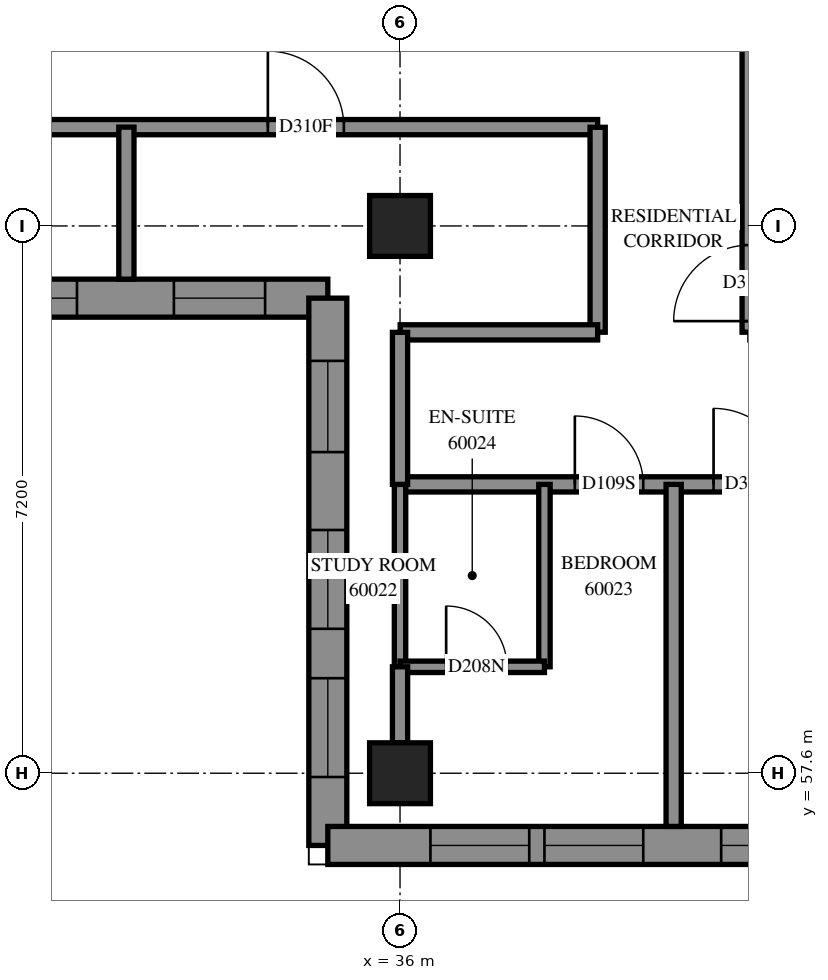
"""IFC4 building model, lengths in metres.
Left out: names, types, materials, properties, quantities, classifications, styles, units other than length and angle.
Written with IfcOpenShell. Run it as: python <this file> out.ifc"""

import sys

from ifc_helpers import new_model, si_unit, direction, frame, frame_2d, origin, origin_2d, place, context, subcontext, project, spatial, polyline, rectangle, outline, extrude, element, fill, save


model = new_model("IFC4")
c1 = context("Model", 3, precision=1e-05, world=origin(), true_north=direction((0.0, 1.0)))
c2 = subcontext(c1, "Body", "Model", "MODEL_VIEW")
j1 = project(units=[si_unit("LENGTHUNIT", "METRE"), si_unit("PLANEANGLEUNIT", "RADIAN")], contexts=[c1])
p1 = place(None, origin())
s1 = spatial("IfcSite", under=j1, at=p1, CompositionType="ELEMENT")
p2 = place(p1, origin())
s2 = spatial("IfcBuilding", under=s1, at=p2, CompositionType="ELEMENT")
p3 = place(p2, frame((0.0, 0.0, 220.2)))
s3 = spatial("IfcBuildingStorey", under=s2, at=p3, CompositionType="ELEMENT", Elevation=220.2)
for number, where, z_axis, x_axis in (
    (1, (36.0, 57.6, 0.0), (0.0, 0.0, 1.0), (1.0, 0.0, 0.0)),
    (2, (36.0, 64.8, 0.0), (0.0, 0.0, 1.0), (1.0, 0.0, 0.0)),
):
    element("IfcColumn", number, at=place(p3, frame(where, z_axis=z_axis, x_axis=x_axis)), inside=s3, PredefinedType="COLUMN", context=c2, shape_type="SweptSolid", body=[
        extrude(rectangle(XDim=0.8, YDim=0.8, at=origin_2d()), origin(), (0.0, 0.0, 1.0), 3.1),
    ])
p4 = place(p3, frame((26.678, 63.85, 0.0), z_axis=(0.0, 0.0, 1.0), x_axis=(1.0, 0.0, 0.0)))
e3 = element("IfcWall", 3, at=p4, inside=s3, PredefinedType="SOLIDWALL", context=c2, shape_type="SweptSolid", body=[
    extrude(outline(polyline([(-0.25, -0.25), (8.122, -0.25), (8.622, 0.25), (0.25, 0.25), (-0.25, -0.25)])), origin(), (0.0, 0.0, 1.0), 3.1),
])
p5 = place(p4, frame((2.272, 0.0, 0.45)))
e4 = element("IfcOpeningElement", 4, at=p5, cuts=e3, PredefinedType="OPENING", context=c2, shape_type="SweptSolid", body=[
    extrude(rectangle(XDim=1.3, YDim=2.5, at=frame_2d((0.65, 1.25))), frame((0.0, 0.26, 0.0), z_axis=(0.0, -1.0, 0.0), x_axis=(1.0, 0.0, 0.0)), (0.0, 0.0, 1.0), 0.52),
])
p6 = place(p4, frame((3.772, 0.0, 0.45)))
e5 = element("IfcOpeningElement", 5, at=p6, cuts=e3, PredefinedType="OPENING", context=c2, shape_type="SweptSolid", body=[
    extrude(rectangle(XDim=1.3, YDim=2.5, at=frame_2d((0.65, 1.25))), frame((0.0, 0.26, 0.0), z_axis=(0.0, -1.0, 0.0), x_axis=(1.0, 0.0, 0.0)), (0.0, 0.0, 1.0), 0.52),
])
p7 = place(p4, frame((0.686, 0.0, 0.45)))
e6 = element("IfcOpeningElement", 6, at=p7, cuts=e3, PredefinedType="OPENING", context=c2, shape_type="SweptSolid", body=[
    extrude(rectangle(XDim=1.2, YDim=2.5, at=frame_2d((0.6, 1.25))), frame((0.0, 0.26, 0.0), z_axis=(0.0, -1.0, 0.0), x_axis=(1.0, 0.0, 0.0)), (0.0, 0.0, 1.0), 0.52),
])
p8 = place(p4, frame((6.347, 0.0, 0.45)))
e7 = element("IfcOpeningElement", 7, at=p8, cuts=e3, PredefinedType="OPENING", context=c2, shape_type="SweptSolid", body=[
    extrude(rectangle(XDim=1.2, YDim=2.5, at=frame_2d((0.6, 1.25))), frame((0.0, 0.26, 0.0), z_axis=(0.0, -1.0, 0.0), x_axis=(1.0, 0.0, 0.0)), (0.0, 0.0, 1.0), 0.52),
])
p9 = place(p3, frame((35.05, 63.85, 0.0), z_axis=(0.0, 0.0, 1.0), x_axis=(0.0, -1.0, 0.0)))
e8 = element("IfcWall", 8, at=p9, inside=s3, PredefinedType="SOLIDWALL", context=c2, shape_type="SweptSolid", body=[
    extrude(outline(polyline([(0.25, -0.25), (7.45, -0.25), (6.95, 0.25), (-0.25, 0.25), (0.25, -0.25)])), origin(), (0.0, 0.0, 1.0), 3.1),
])
p10 = place(p9, frame((3.05, 0.0, 0.45)))
e9 = element("IfcOpeningElement", 9, at=p10, cuts=e8, PredefinedType="OPENING", context=c2, shape_type="SweptSolid", body=[
    extrude(rectangle(XDim=1.3, YDim=2.5, at=frame_2d((0.65, 1.25))), frame((0.0, 0.26, 0.0), z_axis=(0.0, -1.0, 0.0), x_axis=(1.0, 0.0, 0.0)), (0.0, 0.0, 1.0), 0.52),
])
p11 = place(p9, frame((5.0, 0.0, 0.45)))
e10 = element("IfcOpeningElement", 10, at=p11, cuts=e8, PredefinedType="OPENING", context=c2, shape_type="SweptSolid", body=[
    extrude(rectangle(XDim=1.3, YDim=2.5, at=frame_2d((0.65, 1.25))), frame((0.0, 0.26, 0.0), z_axis=(0.0, -1.0, 0.0), x_axis=(1.0, 0.0, 0.0)), (0.0, 0.0, 1.0), 0.52),
])
p12 = place(p9, frame((0.825, 0.0, 0.45)))
e11 = element("IfcOpeningElement", 11, at=p12, cuts=e8, PredefinedType="OPENING", context=c2, shape_type="SweptSolid", body=[
    extrude(rectangle(XDim=1.2, YDim=2.5, at=frame_2d((0.6, 1.25))), frame((0.0, 0.26, 0.0), z_axis=(0.0, -1.0, 0.0), x_axis=(1.0, 0.0, 0.0)), (0.0, 0.0, 1.0), 0.52),
])
p13 = place(p3, frame((35.05, 56.65, 0.0), z_axis=(0.0, 0.0, 1.0), x_axis=(1.0, 0.0, 0.0)))
e12 = element("IfcWall", 12, at=p13, inside=s3, PredefinedType="SOLIDWALL", context=c2, shape_type="SweptSolid", body=[
    extrude(outline(polyline([(-0.25, -0.25), (6.95, -0.25), (7.45, 0.25), (0.25, 0.25), (-0.25, -0.25)])), origin(), (0.0, 0.0, 1.0), 3.1),
])
p14 = place(p13, frame((1.35, 0.0, 0.45)))
e13 = element("IfcOpeningElement", 13, at=p14, cuts=e12, PredefinedType="OPENING", context=c2, shape_type="SweptSolid", body=[
    extrude(rectangle(XDim=1.3, YDim=2.5, at=frame_2d((0.65, 1.25))), frame((0.0, 0.26, 0.0), z_axis=(0.0, -1.0, 0.0), x_axis=(1.0, 0.0, 0.0)), (0.0, 0.0, 1.0), 0.52),
])
p15 = place(p13, frame((2.85, 0.0, 0.45)))
e14 = element("IfcOpeningElement", 14, at=p15, cuts=e12, PredefinedType="OPENING", context=c2, shape_type="SweptSolid", body=[
    extrude(rectangle(XDim=1.3, YDim=2.5, at=frame_2d((0.65, 1.25))), frame((0.0, 0.26, 0.0), z_axis=(0.0, -1.0, 0.0), x_axis=(1.0, 0.0, 0.0)), (0.0, 0.0, 1.0), 0.52),
])
p16 = place(p13, frame((5.175, 0.0, 0.45)))
e15 = element("IfcOpeningElement", 15, at=p16, cuts=e12, PredefinedType="OPENING", context=c2, shape_type="SweptSolid", body=[
    extrude(rectangle(XDim=1.2, YDim=2.5, at=frame_2d((0.6, 1.25))), frame((0.0, 0.26, 0.0), z_axis=(0.0, -1.0, 0.0), x_axis=(1.0, 0.0, 0.0)), (0.0, 0.0, 1.0), 0.52),
])
p17 = place(p3, frame((36.0, 61.4, 0.0), z_axis=(0.0, 0.0, 1.0), x_axis=(1.0, 0.0, 0.0)))
e16 = element("IfcWall", 16, at=p17, inside=s3, PredefinedType="PARTITIONING", context=c2, shape_type="SweptSolid", body=[
    extrude(rectangle(XDim=17.0, YDim=0.2, at=frame_2d((8.5, 0.0))), origin(), (0.0, 0.0, 1.0), 3.1),
])
p18 = place(p17, frame((2.3, 0.0, 0.0)))
e17 = element("IfcOpeningElement", 17, at=p18, cuts=e16, PredefinedType="OPENING", context=c2, shape_type="SweptSolid", body=[
    extrude(rectangle(XDim=0.9, YDim=2.1, at=frame_2d((0.45, 1.05))), frame((0.0, 0.11, 0.0), z_axis=(0.0, -1.0, 0.0), x_axis=(1.0, 0.0, 0.0)), (0.0, 0.0, 1.0), 0.22),
])
p19 = place(p17, frame((4.125, 0.0, 0.0)))
e18 = element("IfcOpeningElement", 18, at=p19, cuts=e16, PredefinedType="OPENING", context=c2, shape_type="SweptSolid", body=[
    extrude(rectangle(XDim=1.0, YDim=2.1, at=frame_2d((0.5, 1.05))), frame((0.0, 0.11, 0.0), z_axis=(0.0, -1.0, 0.0), x_axis=(1.0, 0.0, 0.0)), (0.0, 0.0, 1.0), 0.22),
])
p20 = place(p17, frame((9.5, 0.0, 0.0)))
e19 = element("IfcOpeningElement", 19, at=p20, cuts=e16, PredefinedType="OPENING", context=c2, shape_type="SweptSolid", body=[
    extrude(rectangle(XDim=0.9, YDim=2.1, at=frame_2d((0.45, 1.05))), frame((0.0, 0.11, 0.0), z_axis=(0.0, -1.0, 0.0), x_axis=(1.0, 0.0, 0.0)), (0.0, 0.0, 1.0), 0.22),
])
p21 = place(p17, frame((11.48, 0.0, 0.0)))
e20 = element("IfcOpeningElement", 20, at=p21, cuts=e16, PredefinedType="OPENING", context=c2, shape_type="SweptSolid", body=[
    extrude(rectangle(XDim=1.0, YDim=2.1, at=frame_2d((0.5, 1.05))), frame((0.0, 0.11, 0.0), z_axis=(0.0, -1.0, 0.0), x_axis=(1.0, 0.0, 0.0)), (0.0, 0.0, 1.0), 0.22),
])
p22 = place(p17, frame((15.805, 0.0, 0.0)))
e21 = element("IfcOpeningElement", 21, at=p22, cuts=e16, PredefinedType="OPENING", context=c2, shape_type="SweptSolid", body=[
    extrude(rectangle(XDim=1.0, YDim=2.1, at=frame_2d((0.5, 1.05))), frame((0.0, 0.11, 0.0), z_axis=(0.0, -1.0, 0.0), x_axis=(1.0, 0.0, 0.0)), (0.0, 0.0, 1.0), 0.22),
])
p23 = place(p3, frame((28.802, 66.1, 0.0), z_axis=(0.0, 0.0, 1.0), x_axis=(1.0, 0.0, 0.0)))
e22 = element("IfcWall", 22, at=p23, inside=s3, PredefinedType="PARTITIONING", context=c2, shape_type="SweptSolid", body=[
    extrude(rectangle(XDim=9.798, YDim=0.2, at=frame_2d((4.899, 0.0))), origin(), (0.0, 0.0, 1.0), 3.1),
])
p24 = place(p23, frame((0.449, 0.0, 0.0)))
e23 = element("IfcOpeningElement", 23, at=p24, cuts=e22, PredefinedType="OPENING", context=c2, shape_type="SweptSolid", body=[
    extrude(rectangle(XDim=1.0, YDim=2.1, at=frame_2d((0.5, 1.05))), frame((0.0, 0.11, 0.0), z_axis=(0.0, -1.0, 0.0), x_axis=(1.0, 0.0, 0.0)), (0.0, 0.0, 1.0), 0.22),
])
p25 = place(p23, frame((5.459, 0.0, 0.0)))
e24 = element("IfcOpeningElement", 24, at=p25, cuts=e22, PredefinedType="OPENING", context=c2, shape_type="SweptSolid", body=[
    extrude(rectangle(XDim=1.0, YDim=2.1, at=frame_2d((0.5, 1.05))), frame((0.0, 0.11, 0.0), z_axis=(0.0, -1.0, 0.0), x_axis=(1.0, 0.0, 0.0)), (0.0, 0.0, 1.0), 0.22),
])
p26 = place(p3, frame((40.6, 63.402, 0.0), z_axis=(0.0, 0.0, 1.0), x_axis=(0.0, 1.0, 0.0)))
e25 = element("IfcWall", 25, at=p26, inside=s3, PredefinedType="PARTITIONING", context=c2, shape_type="SweptSolid", body=[
    extrude(rectangle(XDim=4.698, YDim=0.2, at=frame_2d((2.349, 0.0))), origin(), (0.0, 0.0, 1.0), 3.1),
])
p27 = place(p26, frame((0.146, 0.0, 0.0)))
e26 = element("IfcOpeningElement", 26, at=p27, cuts=e25, PredefinedType="OPENING", context=c2, shape_type="SweptSolid", body=[
    extrude(rectangle(XDim=1.0, YDim=2.1, at=frame_2d((0.5, 1.05))), frame((0.0, 0.11, 0.0), z_axis=(0.0, -1.0, 0.0), x_axis=(1.0, 0.0, 0.0)), (0.0, 0.0, 1.0), 0.22),
])
p28 = place(p3, frame((39.6, 56.9, 0.0), z_axis=(0.0, 0.0, 1.0), x_axis=(0.0, 1.0, 0.0)))
e27 = element("IfcWall", 27, at=p28, inside=s3, PredefinedType="PARTITIONING", context=c2, shape_type="SweptSolid", body=[
    extrude(rectangle(XDim=4.5, YDim=0.2, at=frame_2d((2.25, 0.0))), origin(), (0.0, 0.0, 1.0), 3.1),
])
p29 = place(p3, frame((38.6, 63.402, 0.0), z_axis=(0.0, 0.0, 1.0), x_axis=(0.0, 1.0, 0.0)))
e28 = element("IfcWall", 28, at=p29, inside=s3, PredefinedType="PARTITIONING", context=c2, shape_type="SweptSolid", body=[
    extrude(rectangle(XDim=2.696, YDim=0.2, at=frame_2d((1.348, 0.0))), origin(), (0.0, 0.0, 1.0), 3.1),
])
p30 = place(p3, frame((36.002, 63.4, 0.0), z_axis=(0.0, 0.0, 1.0), x_axis=(1.0, 0.0, 0.0)))
e29 = element("IfcWall", 29, at=p30, inside=s3, PredefinedType="PARTITIONING", context=c2, shape_type="SweptSolid", body=[
    extrude(rectangle(XDim=2.598, YDim=0.2, at=frame_2d((1.299, 0.0))), origin(), (0.0, 0.0, 1.0), 3.1),
])
p31 = place(p3, frame((37.9, 59.0, 0.0), z_axis=(0.0, 0.0, 1.0), x_axis=(0.0, 1.0, 0.0)))
e30 = element("IfcWall", 30, at=p31, inside=s3, PredefinedType="PARTITIONING", context=c2, shape_type="SweptSolid", body=[
    extrude(rectangle(XDim=2.4, YDim=0.15, at=frame_2d((1.2, 0.0))), origin(), (0.0, 0.0, 1.0), 3.1),
])
p32 = place(p3, frame((36.0, 59.0, 0.0), z_axis=(0.0, 0.0, 1.0), x_axis=(0.0, 1.0, 0.0)))
e31 = element("IfcWall", 31, at=p32, inside=s3, PredefinedType="PARTITIONING", context=c2, shape_type="SweptSolid", body=[
    extrude(rectangle(XDim=2.4, YDim=0.15, at=frame_2d((1.2, 0.0))), origin(), (0.0, 0.0, 1.0), 2.6),
])
p33 = place(p3, frame((36.0, 61.4, 0.0), z_axis=(0.0, 0.0, 1.0), x_axis=(0.0, 1.0, 0.0)))
e32 = element("IfcWall", 32, at=p33, inside=s3, PredefinedType="PARTITIONING", context=c2, shape_type="SweptSolid", body=[
    extrude(rectangle(XDim=2.0, YDim=0.2, at=frame_2d((1.0, 0.0))), origin(), (0.0, 0.0, 1.0), 2.6),
])
p34 = place(p3, frame((32.4, 64.1, 0.0), z_axis=(0.0, 0.0, 1.0), x_axis=(0.0, 1.0, 0.0)))
e33 = element("IfcWall", 33, at=p34, inside=s3, PredefinedType="PARTITIONING", context=c2, shape_type="SweptSolid", body=[
    extrude(rectangle(XDim=2.0, YDim=0.2, at=frame_2d((1.0, 0.0))), origin(), (0.0, 0.0, 1.0), 3.1),
])
p35 = place(p3, frame((36.0, 59.0, 0.0), z_axis=(0.0, 0.0, 1.0), x_axis=(1.0, 0.0, 0.0)))
e34 = element("IfcWall", 34, at=p35, inside=s3, PredefinedType="PARTITIONING", context=c2, shape_type="SweptSolid", body=[
    extrude(rectangle(XDim=1.9, YDim=0.15, at=frame_2d((0.95, 0.0))), origin(), (0.0, 0.0, 1.0), 3.1),
])
p36 = place(p35, frame((0.607, 0.0, 0.0)))
e35 = element("IfcOpeningElement", 35, at=p36, cuts=e34, PredefinedType="OPENING", context=c2, shape_type="SweptSolid", body=[
    extrude(rectangle(XDim=0.8, YDim=2.1, at=frame_2d((0.4, 1.05))), frame((0.0, 0.085, 0.0), z_axis=(0.0, -1.0, 0.0), x_axis=(1.0, 0.0, 0.0)), (0.0, 0.0, 1.0), 0.17),
])
p37 = place(p3, frame((36.0, 58.0, 0.0), z_axis=(0.0, 0.0, 1.0), x_axis=(0.0, 1.0, 0.0)))
e36 = element("IfcWall", 36, at=p37, inside=s3, PredefinedType="PARTITIONING", context=c2, shape_type="SweptSolid", body=[
    extrude(rectangle(XDim=1.0, YDim=0.2, at=frame_2d((0.5, 0.0))), origin(), (0.0, 0.0, 1.0), 2.6),
])
p38 = place(p6, origin())
e37 = element("IfcWindow", 37, at=p38, inside=s3, PartitioningType="SINGLE_PANEL", PredefinedType="WINDOW", context=c2, shape_type="SweptSolid", body=[
    extrude(rectangle(XDim=1.3, YDim=2.5, at=frame_2d((0.65, 1.25))), frame((0.0, 0.18, 0.0), z_axis=(0.0, -1.0, 0.0), x_axis=(1.0, 0.0, 0.0)), (0.0, 0.0, 1.0), 0.06),
])
fill(e5, e37)
p39 = place(p8, origin())
e38 = element("IfcWindow", 38, at=p39, inside=s3, PartitioningType="SINGLE_PANEL", PredefinedType="WINDOW", context=c2, shape_type="SweptSolid", body=[
    extrude(rectangle(XDim=1.2, YDim=2.5, at=frame_2d((0.6, 1.25))), frame((0.0, 0.18, 0.0), z_axis=(0.0, -1.0, 0.0), x_axis=(1.0, 0.0, 0.0)), (0.0, 0.0, 1.0), 0.06),
])
fill(e7, e38)
p40 = place(p10, origin())
e39 = element("IfcWindow", 39, at=p40, inside=s3, PartitioningType="SINGLE_PANEL", PredefinedType="WINDOW", context=c2, shape_type="SweptSolid", body=[
    extrude(rectangle(XDim=1.3, YDim=2.5, at=frame_2d((0.65, 1.25))), frame((0.0, 0.18, 0.0), z_axis=(0.0, -1.0, 0.0), x_axis=(1.0, 0.0, 0.0)), (0.0, 0.0, 1.0), 0.06),
])
fill(e9, e39)
p41 = place(p11, origin())
e40 = element("IfcWindow", 40, at=p41, inside=s3, PartitioningType="SINGLE_PANEL", PredefinedType="WINDOW", context=c2, shape_type="SweptSolid", body=[
    extrude(rectangle(XDim=1.3, YDim=2.5, at=frame_2d((0.65, 1.25))), frame((0.0, 0.18, 0.0), z_axis=(0.0, -1.0, 0.0), x_axis=(1.0, 0.0, 0.0)), (0.0, 0.0, 1.0), 0.06),
])
fill(e10, e40)
p42 = place(p12, origin())
e41 = element("IfcWindow", 41, at=p42, inside=s3, PartitioningType="SINGLE_PANEL", PredefinedType="WINDOW", context=c2, shape_type="SweptSolid", body=[
    extrude(rectangle(XDim=1.2, YDim=2.5, at=frame_2d((0.6, 1.25))), frame((0.0, 0.18, 0.0), z_axis=(0.0, -1.0, 0.0), x_axis=(1.0, 0.0, 0.0)), (0.0, 0.0, 1.0), 0.06),
])
fill(e11, e41)
p43 = place(p14, origin())
e42 = element("IfcWindow", 42, at=p43, inside=s3, PartitioningType="SINGLE_PANEL", PredefinedType="WINDOW", context=c2, shape_type="SweptSolid", body=[
    extrude(rectangle(XDim=1.3, YDim=2.5, at=frame_2d((0.65, 1.25))), frame((0.0, 0.18, 0.0), z_axis=(0.0, -1.0, 0.0), x_axis=(1.0, 0.0, 0.0)), (0.0, 0.0, 1.0), 0.06),
])
fill(e13, e42)
p44 = place(p15, origin())
e43 = element("IfcWindow", 43, at=p44, inside=s3, PartitioningType="SINGLE_PANEL", PredefinedType="WINDOW", context=c2, shape_type="SweptSolid", body=[
    extrude(rectangle(XDim=1.3, YDim=2.5, at=frame_2d((0.65, 1.25))), frame((0.0, 0.18, 0.0), z_axis=(0.0, -1.0, 0.0), x_axis=(1.0, 0.0, 0.0)), (0.0, 0.0, 1.0), 0.06),
])
fill(e14, e43)
p45 = place(p16, origin())
e44 = element("IfcWindow", 44, at=p45, inside=s3, PartitioningType="SINGLE_PANEL", PredefinedType="WINDOW", context=c2, shape_type="SweptSolid", body=[
    extrude(rectangle(XDim=1.2, YDim=2.5, at=frame_2d((0.6, 1.25))), frame((0.0, 0.18, 0.0), z_axis=(0.0, -1.0, 0.0), x_axis=(1.0, 0.0, 0.0)), (0.0, 0.0, 1.0), 0.06),
])
fill(e15, e44)
p46 = place(p25, origin())
e45 = element("IfcDoor", 45, at=p46, inside=s3, OperationType="SINGLE_SWING_RIGHT", PredefinedType="DOOR", context=c2, shape_type="SweptSolid", body=[
    extrude(rectangle(XDim=1.0, YDim=2.1, at=frame_2d((0.5, 1.05))), frame((0.0, 0.025, 0.0), z_axis=(0.0, -1.0, 0.0), x_axis=(1.0, 0.0, 0.0)), (0.0, 0.0, 1.0), 0.05),
])
fill(e24, e45)
p47 = place(p18, origin())
e46 = element("IfcDoor", 46, at=p47, inside=s3, OperationType="SINGLE_SWING_LEFT", PredefinedType="DOOR", context=c2, shape_type="SweptSolid", body=[
    extrude(rectangle(XDim=0.9, YDim=2.1, at=frame_2d((0.45, 1.05))), frame((0.0, 0.025, 0.0), z_axis=(0.0, -1.0, 0.0), x_axis=(1.0, 0.0, 0.0)), (0.0, 0.0, 1.0), 0.05),
])
fill(e17, e46)
p48 = place(p36, origin())
e47 = element("IfcDoor", 47, at=p48, inside=s3, OperationType="SINGLE_SWING_RIGHT", PredefinedType="DOOR", context=c2, shape_type="SweptSolid", body=[
    extrude(rectangle(XDim=0.8, YDim=2.1, at=frame_2d((0.4, 1.05))), frame((0.0, 0.025, 0.0), z_axis=(0.0, -1.0, 0.0), x_axis=(1.0, 0.0, 0.0)), (0.0, 0.0, 1.0), 0.05),
])
fill(e35, e47)
p49 = place(p19, origin())
e48 = element("IfcDoor", 48, at=p49, inside=s3, OperationType="SINGLE_SWING_RIGHT", PredefinedType="DOOR", context=c2, shape_type="SweptSolid", body=[
    extrude(rectangle(XDim=1.0, YDim=2.1, at=frame_2d((0.5, 1.05))), frame((0.0, 0.025, 0.0), z_axis=(0.0, -1.0, 0.0), x_axis=(1.0, 0.0, 0.0)), (0.0, 0.0, 1.0), 0.05),
])
fill(e18, e48)
p50 = place(p27, origin())
e49 = element("IfcDoor", 49, at=p50, inside=s3, OperationType="SINGLE_SWING_LEFT", PredefinedType="DOOR", context=c2, shape_type="SweptSolid", body=[
    extrude(rectangle(XDim=1.0, YDim=2.1, at=frame_2d((0.5, 1.05))), frame((0.0, 0.025, 0.0), z_axis=(0.0, -1.0, 0.0), x_axis=(1.0, 0.0, 0.0)), (0.0, 0.0, 1.0), 0.05),
])
fill(e26, e49)
save(model, sys.argv[1])
